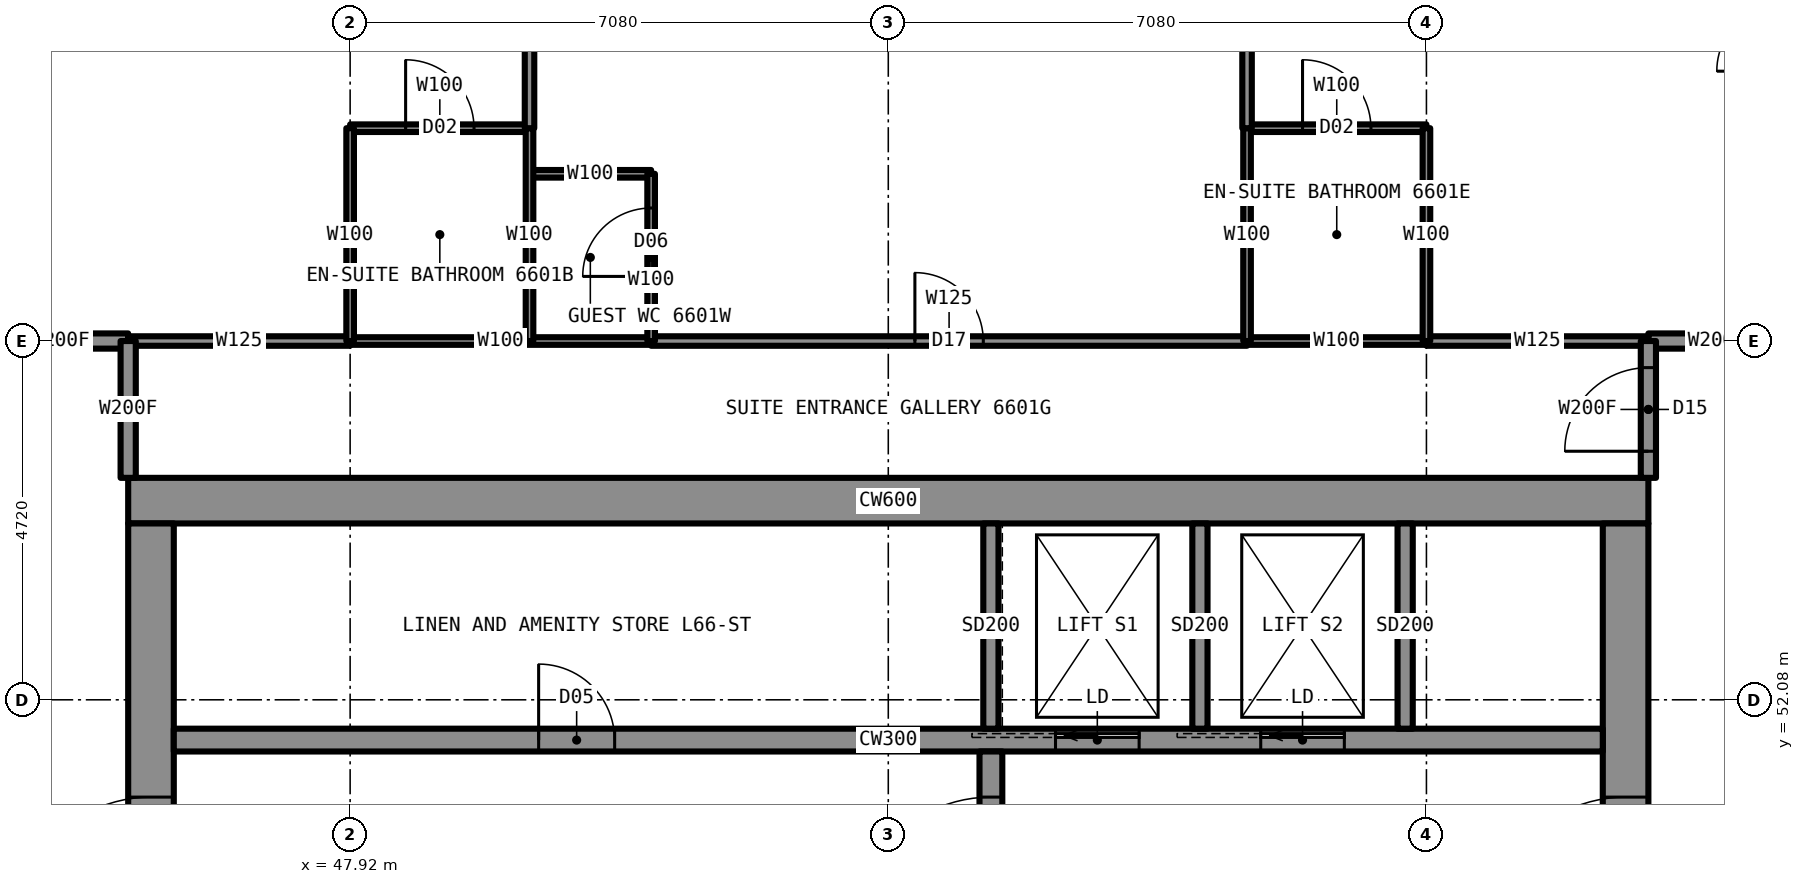
"""IFC4 building model, lengths in metres.
Left out: names, types, materials, properties, quantities, classifications, styles, units other than length and angle.
Written with IfcOpenShell. Run it as: python <this file> out.ifc"""

import sys

from ifc_helpers import new_model, si_unit, direction, frame, frame_2d, origin, place, context, subcontext, project, spatial, rectangle, extrude, element, fill, save


model = new_model("IFC4")
c1 = context("Model", 3, precision=1e-05, world=origin(), true_north=direction((0.0, 1.0)))
c2 = subcontext(c1, "Body", "Model", "MODEL_VIEW")
j1 = project(units=[si_unit("LENGTHUNIT", "METRE"), si_unit("PLANEANGLEUNIT", "RADIAN")], contexts=[c1])
p1 = place(None, origin())
s1 = spatial("IfcSite", under=j1, at=p1, CompositionType="ELEMENT")
p2 = place(p1, origin())
s2 = spatial("IfcBuilding", under=s1, at=p2, CompositionType="ELEMENT")
p3 = place(p2, frame((0.0, 0.0, 237.2)))
s3 = spatial("IfcBuildingStorey", under=s2, at=p3, CompositionType="ELEMENT", Elevation=237.2)
p4 = place(p3, frame((45.0, 54.7, 0.0), z_axis=(0.0, 0.0, 1.0), x_axis=(1.0, 0.0, 0.0)))
e1 = element("IfcWall", 1, at=p4, inside=s3, PredefinedType="SHEAR", context=c2, shape_type="SweptSolid", body=[
    extrude(rectangle(XDim=20.0, YDim=0.6, at=frame_2d((10.0, 0.0))), origin(), (0.0, 0.0, 1.0), 3.5),
])
p5 = place(p3, frame((64.7, 35.6, 0.0), z_axis=(0.0, 0.0, 1.0), x_axis=(0.0, 1.0, 0.0)))
e2 = element("IfcWall", 2, at=p5, inside=s3, PredefinedType="SHEAR", context=c2, shape_type="SweptSolid", body=[
    extrude(rectangle(XDim=18.8, YDim=0.6, at=frame_2d((9.4, 0.0))), origin(), (0.0, 0.0, 1.0), 3.5),
])
p6 = place(p5, frame((13.4, 0.0, 0.0)))
e3 = element("IfcOpeningElement", 3, at=p6, cuts=e2, PredefinedType="OPENING", context=c2, shape_type="SweptSolid", body=[
    extrude(rectangle(XDim=1.8, YDim=2.2, at=frame_2d((0.9, 1.1))), frame((0.0, 0.31, 0.0), z_axis=(0.0, -1.0, 0.0), x_axis=(1.0, 0.0, 0.0)), (0.0, 0.0, 1.0), 0.62),
])
p7 = place(p5, frame((3.6, 0.0, 0.0)))
e4 = element("IfcOpeningElement", 4, at=p7, cuts=e2, PredefinedType="OPENING", context=c2, shape_type="SweptSolid", body=[
    extrude(rectangle(XDim=1.8, YDim=2.2, at=frame_2d((0.9, 1.1))), frame((0.0, 0.31, 0.0), z_axis=(0.0, -1.0, 0.0), x_axis=(1.0, 0.0, 0.0)), (0.0, 0.0, 1.0), 0.62),
])
p8 = place(p3, frame((45.3, 35.6, 0.0), z_axis=(0.0, 0.0, 1.0), x_axis=(0.0, 1.0, 0.0)))
e5 = element("IfcWall", 5, at=p8, inside=s3, PredefinedType="SHEAR", context=c2, shape_type="SweptSolid", body=[
    extrude(rectangle(XDim=18.8, YDim=0.6, at=frame_2d((9.4, 0.0))), origin(), (0.0, 0.0, 1.0), 3.5),
])
p9 = place(p8, frame((13.4, 0.0, 0.0)))
e6 = element("IfcOpeningElement", 6, at=p9, cuts=e5, PredefinedType="OPENING", context=c2, shape_type="SweptSolid", body=[
    extrude(rectangle(XDim=1.8, YDim=2.2, at=frame_2d((0.9, 1.1))), frame((0.0, 0.31, 0.0), z_axis=(0.0, -1.0, 0.0), x_axis=(1.0, 0.0, 0.0)), (0.0, 0.0, 1.0), 0.62),
])
p10 = place(p8, frame((3.6, 0.0, 0.0)))
e7 = element("IfcOpeningElement", 7, at=p10, cuts=e5, PredefinedType="OPENING", context=c2, shape_type="SweptSolid", body=[
    extrude(rectangle(XDim=1.8, YDim=2.2, at=frame_2d((0.9, 1.1))), frame((0.0, 0.31, 0.0), z_axis=(0.0, -1.0, 0.0), x_axis=(1.0, 0.0, 0.0)), (0.0, 0.0, 1.0), 0.62),
])
p11 = place(p8, frame((6.4, 0.0, 0.0)))
e8 = element("IfcOpeningElement", 8, at=p11, cuts=e5, PredefinedType="OPENING", context=c2, shape_type="SweptSolid", body=[
    extrude(rectangle(XDim=1.2, YDim=2.2, at=frame_2d((0.6, 1.1))), frame((0.0, 0.31, 0.0), z_axis=(0.0, -1.0, 0.0), x_axis=(1.0, 0.0, 0.0)), (0.0, 0.0, 1.0), 0.62),
])
p12 = place(p3, frame((45.6, 51.55, 0.0), z_axis=(0.0, 0.0, 1.0), x_axis=(1.0, 0.0, 0.0)))
e9 = element("IfcWall", 9, at=p12, inside=s3, PredefinedType="SHEAR", context=c2, shape_type="SweptSolid", body=[
    extrude(rectangle(XDim=18.8, YDim=0.3, at=frame_2d((9.4, 0.0))), origin(), (0.0, 0.0, 1.0), 3.5),
])
p13 = place(p12, frame((4.8, 0.0, 0.0)))
e10 = element("IfcOpeningElement", 10, at=p13, cuts=e9, PredefinedType="OPENING", context=c2, shape_type="SweptSolid", body=[
    extrude(rectangle(XDim=1.0, YDim=2.1, at=frame_2d((0.5, 1.05))), frame((0.0, 0.16, 0.0), z_axis=(0.0, -1.0, 0.0), x_axis=(1.0, 0.0, 0.0)), (0.0, 0.0, 1.0), 0.32),
])
p14 = place(p12, frame((11.6, 0.0, 0.0)))
e11 = element("IfcOpeningElement", 11, at=p14, cuts=e9, PredefinedType="OPENING", context=c2, shape_type="SweptSolid", body=[
    extrude(rectangle(XDim=1.1, YDim=2.2, at=frame_2d((0.55, 1.1))), frame((0.0, 0.16, 0.0), z_axis=(0.0, -1.0, 0.0), x_axis=(1.0, 0.0, 0.0)), (0.0, 0.0, 1.0), 0.32),
])
p15 = place(p12, frame((14.3, 0.0, 0.0)))
e12 = element("IfcOpeningElement", 12, at=p15, cuts=e9, PredefinedType="OPENING", context=c2, shape_type="SweptSolid", body=[
    extrude(rectangle(XDim=1.1, YDim=2.2, at=frame_2d((0.55, 1.1))), frame((0.0, 0.16, 0.0), z_axis=(0.0, -1.0, 0.0), x_axis=(1.0, 0.0, 0.0)), (0.0, 0.0, 1.0), 0.32),
])
p16 = place(p3, frame((56.35, 41.9, 0.0), z_axis=(0.0, 0.0, 1.0), x_axis=(0.0, 1.0, 0.0)))
e13 = element("IfcWall", 13, at=p16, inside=s3, PredefinedType="SHEAR", context=c2, shape_type="SweptSolid", body=[
    extrude(rectangle(XDim=9.5, YDim=0.3, at=frame_2d((4.75, 0.0))), origin(), (0.0, 0.0, 1.0), 3.5),
])
p17 = place(p16, frame((7.1, 0.0, 0.0)))
e14 = element("IfcOpeningElement", 14, at=p17, cuts=e13, PredefinedType="OPENING", context=c2, shape_type="SweptSolid", body=[
    extrude(rectangle(XDim=1.8, YDim=2.2, at=frame_2d((0.9, 1.1))), frame((0.0, 0.16, 0.0), z_axis=(0.0, -1.0, 0.0), x_axis=(1.0, 0.0, 0.0)), (0.0, 0.0, 1.0), 0.32),
])
p18 = place(p3, frame((47.92, 56.8, 0.0), z_axis=(0.0, 0.0, 1.0), x_axis=(1.0, 0.0, 0.0)))
e15 = element("IfcWall", 15, at=p18, inside=s3, PredefinedType="PARTITIONING", context=c2, shape_type="SweptSolid", body=[
    extrude(rectangle(XDim=3.96, YDim=0.1, at=frame_2d((1.98, 0.0))), origin(), (0.0, 0.0, 1.0), 3.33),
])
p19 = place(p3, frame((59.72, 56.8, 0.0), z_axis=(0.0, 0.0, 1.0), x_axis=(1.0, 0.0, 0.0)))
e16 = element("IfcWall", 16, at=p19, inside=s3, PredefinedType="PARTITIONING", context=c2, shape_type="SweptSolid", body=[
    extrude(rectangle(XDim=2.36, YDim=0.1, at=frame_2d((1.18, 0.0))), origin(), (0.0, 0.0, 1.0), 3.33),
])
p20 = place(p3, frame((43.22, 56.8, 0.0), z_axis=(0.0, 0.0, 1.0), x_axis=(1.0, 0.0, 0.0)))
e17 = element("IfcWall", 17, at=p20, inside=s3, PredefinedType="PARTITIONING", context=c2, shape_type="SweptSolid", body=[
    extrude(rectangle(XDim=1.78, YDim=0.2, at=frame_2d((0.89, 0.0))), origin(), (0.0, 0.0, 1.0), 3.33),
])
p21 = place(p3, frame((65.0, 56.8, 0.0), z_axis=(0.0, 0.0, 1.0), x_axis=(1.0, 0.0, 0.0)))
e18 = element("IfcWall", 18, at=p21, inside=s3, PredefinedType="PARTITIONING", context=c2, shape_type="SweptSolid", body=[
    extrude(rectangle(XDim=1.8, YDim=0.2, at=frame_2d((0.9, 0.0))), origin(), (0.0, 0.0, 1.0), 3.33),
])
p22 = place(p3, frame((45.0, 56.8, 0.0), z_axis=(0.0, 0.0, 1.0), x_axis=(1.0, 0.0, 0.0)))
e19 = element("IfcWall", 19, at=p22, inside=s3, PredefinedType="PARTITIONING", context=c2, shape_type="SweptSolid", body=[
    extrude(rectangle(XDim=2.92, YDim=0.125, at=frame_2d((1.46, 0.0))), origin(), (0.0, 0.0, 1.0), 3.33),
])
p23 = place(p3, frame((51.88, 56.8, 0.0), z_axis=(0.0, 0.0, 1.0), x_axis=(1.0, 0.0, 0.0)))
e20 = element("IfcWall", 20, at=p23, inside=s3, PredefinedType="PARTITIONING", context=c2, shape_type="SweptSolid", body=[
    extrude(rectangle(XDim=7.84, YDim=0.125, at=frame_2d((3.92, 0.0))), origin(), (0.0, 0.0, 1.0), 3.33),
])
p24 = place(p23, frame((3.47, 0.0, 0.0)))
e21 = element("IfcOpeningElement", 21, at=p24, cuts=e20, PredefinedType="OPENING", context=c2, shape_type="SweptSolid", body=[
    extrude(rectangle(XDim=0.9, YDim=2.2, at=frame_2d((0.45, 1.1))), frame((0.0, 0.073, 0.0), z_axis=(0.0, -1.0, 0.0), x_axis=(1.0, 0.0, 0.0)), (0.0, 0.0, 1.0), 0.145),
])
p25 = place(p3, frame((62.08, 56.8, 0.0), z_axis=(0.0, 0.0, 1.0), x_axis=(1.0, 0.0, 0.0)))
e22 = element("IfcWall", 22, at=p25, inside=s3, PredefinedType="PARTITIONING", context=c2, shape_type="SweptSolid", body=[
    extrude(rectangle(XDim=2.92, YDim=0.125, at=frame_2d((1.46, 0.0))), origin(), (0.0, 0.0, 1.0), 3.33),
])
p26 = place(p3, frame((50.28, 59.0, 0.0), z_axis=(0.0, 0.0, 1.0), x_axis=(1.0, 0.0, 0.0)))
e23 = element("IfcWall", 23, at=p26, inside=s3, PredefinedType="PARTITIONING", context=c2, shape_type="SweptSolid", body=[
    extrude(rectangle(XDim=1.6, YDim=0.1, at=frame_2d((0.8, 0.0))), origin(), (0.0, 0.0, 1.0), 3.33),
])
p27 = place(p3, frame((47.92, 59.6, 0.0), z_axis=(0.0, 0.0, 1.0), x_axis=(1.0, 0.0, 0.0)))
e24 = element("IfcWall", 24, at=p27, inside=s3, PredefinedType="PARTITIONING", context=c2, shape_type="SweptSolid", body=[
    extrude(rectangle(XDim=2.36, YDim=0.1, at=frame_2d((1.18, 0.0))), origin(), (0.0, 0.0, 1.0), 3.33),
])
p28 = place(p27, frame((0.73, 0.0, 0.0)))
e25 = element("IfcOpeningElement", 25, at=p28, cuts=e24, PredefinedType="OPENING", context=c2, shape_type="SweptSolid", body=[
    extrude(rectangle(XDim=0.9, YDim=2.1, at=frame_2d((0.45, 1.05))), frame((0.0, 0.06, 0.0), z_axis=(0.0, -1.0, 0.0), x_axis=(1.0, 0.0, 0.0)), (0.0, 0.0, 1.0), 0.12),
])
p29 = place(p3, frame((59.72, 59.6, 0.0), z_axis=(0.0, 0.0, 1.0), x_axis=(1.0, 0.0, 0.0)))
e26 = element("IfcWall", 26, at=p29, inside=s3, PredefinedType="PARTITIONING", context=c2, shape_type="SweptSolid", body=[
    extrude(rectangle(XDim=2.36, YDim=0.1, at=frame_2d((1.18, 0.0))), origin(), (0.0, 0.0, 1.0), 3.33),
])
p30 = place(p29, frame((0.73, 0.0, 0.0)))
e27 = element("IfcOpeningElement", 27, at=p30, cuts=e26, PredefinedType="OPENING", context=c2, shape_type="SweptSolid", body=[
    extrude(rectangle(XDim=0.9, YDim=2.1, at=frame_2d((0.45, 1.05))), frame((0.0, 0.06, 0.0), z_axis=(0.0, -1.0, 0.0), x_axis=(1.0, 0.0, 0.0)), (0.0, 0.0, 1.0), 0.12),
])
p31 = place(p3, frame((45.0, 55.0, 0.0), z_axis=(0.0, 0.0, 1.0), x_axis=(0.0, 1.0, 0.0)))
e28 = element("IfcWall", 28, at=p31, inside=s3, PredefinedType="PARTITIONING", context=c2, shape_type="SweptSolid", body=[
    extrude(rectangle(XDim=1.8, YDim=0.2, at=frame_2d((0.9, 0.0))), origin(), (0.0, 0.0, 1.0), 3.33),
])
p32 = place(p3, frame((51.88, 56.8, 0.0), z_axis=(0.0, 0.0, 1.0), x_axis=(0.0, 1.0, 0.0)))
e29 = element("IfcWall", 29, at=p32, inside=s3, PredefinedType="PARTITIONING", context=c2, shape_type="SweptSolid", body=[
    extrude(rectangle(XDim=2.2, YDim=0.1, at=frame_2d((1.1, 0.0))), origin(), (0.0, 0.0, 1.0), 3.33),
])
p33 = place(p32, frame((0.85, 0.0, 0.0)))
e30 = element("IfcOpeningElement", 30, at=p33, cuts=e29, PredefinedType="OPENING", context=c2, shape_type="SweptSolid", body=[
    extrude(rectangle(XDim=0.9, YDim=2.1, at=frame_2d((0.45, 1.05))), frame((0.0, 0.06, 0.0), z_axis=(0.0, -1.0, 0.0), x_axis=(1.0, 0.0, 0.0)), (0.0, 0.0, 1.0), 0.12),
])
p34 = place(p3, frame((50.28, 56.8, 0.0), z_axis=(0.0, 0.0, 1.0), x_axis=(0.0, 1.0, 0.0)))
e31 = element("IfcWall", 31, at=p34, inside=s3, PredefinedType="PARTITIONING", context=c2, shape_type="SweptSolid", body=[
    extrude(rectangle(XDim=2.8, YDim=0.1, at=frame_2d((1.4, 0.0))), origin(), (0.0, 0.0, 1.0), 3.33),
])
p35 = place(p3, frame((50.28, 59.6, 0.0), z_axis=(0.0, 0.0, 1.0), x_axis=(0.0, 1.0, 0.0)))
e32 = element("IfcWall", 32, at=p35, inside=s3, PredefinedType="PARTITIONING", context=c2, shape_type="SweptSolid", body=[
    extrude(rectangle(XDim=3.1, YDim=0.125, at=frame_2d((1.55, 0.0))), origin(), (0.0, 0.0, 1.0), 3.33),
])
p36 = place(p35, frame((1.25, 0.0, 0.0)))
e33 = element("IfcOpeningElement", 33, at=p36, cuts=e32, PredefinedType="OPENING", context=c2, shape_type="SweptSolid", body=[
    extrude(rectangle(XDim=0.9, YDim=2.2, at=frame_2d((0.45, 1.1))), frame((0.0, 0.073, 0.0), z_axis=(0.0, -1.0, 0.0), x_axis=(1.0, 0.0, 0.0)), (0.0, 0.0, 1.0), 0.145),
])
p37 = place(p3, frame((47.92, 56.8, 0.0), z_axis=(0.0, 0.0, 1.0), x_axis=(0.0, 1.0, 0.0)))
e34 = element("IfcWall", 34, at=p37, inside=s3, PredefinedType="PARTITIONING", context=c2, shape_type="SweptSolid", body=[
    extrude(rectangle(XDim=2.8, YDim=0.1, at=frame_2d((1.4, 0.0))), origin(), (0.0, 0.0, 1.0), 2.573),
])
p38 = place(p3, frame((65.0, 55.0, 0.0), z_axis=(0.0, 0.0, 1.0), x_axis=(0.0, 1.0, 0.0)))
e35 = element("IfcWall", 35, at=p38, inside=s3, PredefinedType="PARTITIONING", context=c2, shape_type="SweptSolid", body=[
    extrude(rectangle(XDim=1.8, YDim=0.2, at=frame_2d((0.9, 0.0))), origin(), (0.0, 0.0, 1.0), 3.33),
])
p39 = place(p38, frame((0.35, 0.0, 0.0)))
e36 = element("IfcOpeningElement", 36, at=p39, cuts=e35, PredefinedType="OPENING", context=c2, shape_type="SweptSolid", body=[
    extrude(rectangle(XDim=1.1, YDim=2.2, at=frame_2d((0.55, 1.1))), frame((0.0, 0.11, 0.0), z_axis=(0.0, -1.0, 0.0), x_axis=(1.0, 0.0, 0.0)), (0.0, 0.0, 1.0), 0.22),
])
p40 = place(p3, frame((59.72, 56.8, 0.0), z_axis=(0.0, 0.0, 1.0), x_axis=(0.0, 1.0, 0.0)))
e37 = element("IfcWall", 37, at=p40, inside=s3, PredefinedType="PARTITIONING", context=c2, shape_type="SweptSolid", body=[
    extrude(rectangle(XDim=2.8, YDim=0.1, at=frame_2d((1.4, 0.0))), origin(), (0.0, 0.0, 1.0), 3.33),
])
p41 = place(p3, frame((59.72, 59.6, 0.0), z_axis=(0.0, 0.0, 1.0), x_axis=(0.0, 1.0, 0.0)))
e38 = element("IfcWall", 38, at=p41, inside=s3, PredefinedType="PARTITIONING", context=c2, shape_type="SweptSolid", body=[
    extrude(rectangle(XDim=3.1, YDim=0.125, at=frame_2d((1.55, 0.0))), origin(), (0.0, 0.0, 1.0), 3.33),
])
p42 = place(p41, frame((1.25, 0.0, 0.0)))
e39 = element("IfcOpeningElement", 39, at=p42, cuts=e38, PredefinedType="OPENING", context=c2, shape_type="SweptSolid", body=[
    extrude(rectangle(XDim=0.9, YDim=2.2, at=frame_2d((0.45, 1.1))), frame((0.0, 0.073, 0.0), z_axis=(0.0, -1.0, 0.0), x_axis=(1.0, 0.0, 0.0)), (0.0, 0.0, 1.0), 0.145),
])
p43 = place(p3, frame((62.08, 56.8, 0.0), z_axis=(0.0, 0.0, 1.0), x_axis=(0.0, 1.0, 0.0)))
e40 = element("IfcWall", 40, at=p43, inside=s3, PredefinedType="PARTITIONING", context=c2, shape_type="SweptSolid", body=[
    extrude(rectangle(XDim=2.8, YDim=0.1, at=frame_2d((1.4, 0.0))), origin(), (0.0, 0.0, 1.0), 2.573),
])
for number, where, z_axis, x_axis in (
    (41, (59.1, 51.7, 0.0), (0.0, 0.0, 1.0), (0.0, 1.0, 0.0)),
    (42, (61.8, 51.7, 0.0), (0.0, 0.0, 1.0), (0.0, 1.0, 0.0)),
    (43, (56.35, 51.7, 0.0), (0.0, 0.0, 1.0), (0.0, 1.0, 0.0)),
):
    element("IfcWall", number, at=place(p3, frame(where, z_axis=z_axis, x_axis=x_axis)), inside=s3, PredefinedType="PARTITIONING", context=c2, shape_type="SweptSolid", body=[
        extrude(rectangle(XDim=2.7, YDim=0.2, at=frame_2d((1.35, 0.0))), origin(), (0.0, 0.0, 1.0), 3.33),
    ])
p44 = place(p24, origin())
e44 = element("IfcDoor", 44, at=p44, inside=s3, OperationType="SINGLE_SWING_LEFT", PredefinedType="DOOR", context=c2, shape_type="SweptSolid", body=[
    extrude(rectangle(XDim=0.9, YDim=2.2, at=frame_2d((0.45, 1.1))), frame((0.0, 0.025, 0.0), z_axis=(0.0, -1.0, 0.0), x_axis=(1.0, 0.0, 0.0)), (0.0, 0.0, 1.0), 0.05),
])
fill(e21, e44)
p45 = place(p28, origin())
e45 = element("IfcDoor", 45, at=p45, inside=s3, OperationType="SINGLE_SWING_RIGHT", PredefinedType="DOOR", context=c2, shape_type="SweptSolid", body=[
    extrude(rectangle(XDim=0.9, YDim=2.1, at=frame_2d((0.45, 1.05))), frame((0.0, 0.025, 0.0), z_axis=(0.0, -1.0, 0.0), x_axis=(1.0, 0.0, 0.0)), (0.0, 0.0, 1.0), 0.05),
])
fill(e25, e45)
p46 = place(p30, origin())
e46 = element("IfcDoor", 46, at=p46, inside=s3, OperationType="SINGLE_SWING_RIGHT", PredefinedType="DOOR", context=c2, shape_type="SweptSolid", body=[
    extrude(rectangle(XDim=0.9, YDim=2.1, at=frame_2d((0.45, 1.05))), frame((0.0, 0.025, 0.0), z_axis=(0.0, -1.0, 0.0), x_axis=(1.0, 0.0, 0.0)), (0.0, 0.0, 1.0), 0.05),
])
fill(e27, e46)
p47 = place(p39, origin())
e47 = element("IfcDoor", 47, at=p47, inside=s3, OperationType="SINGLE_SWING_LEFT", PredefinedType="DOOR", context=c2, shape_type="SweptSolid", body=[
    extrude(rectangle(XDim=1.1, YDim=2.2, at=frame_2d((0.55, 1.1))), frame((0.0, 0.025, 0.0), z_axis=(0.0, -1.0, 0.0), x_axis=(1.0, 0.0, 0.0)), (0.0, 0.0, 1.0), 0.05),
])
fill(e36, e47)
p48 = place(p33, origin())
e48 = element("IfcDoor", 48, at=p48, inside=s3, OperationType="SINGLE_SWING_LEFT", PredefinedType="DOOR", context=c2, shape_type="SweptSolid", body=[
    extrude(rectangle(XDim=0.9, YDim=2.1, at=frame_2d((0.45, 1.05))), frame((0.0, 0.025, 0.0), z_axis=(0.0, -1.0, 0.0), x_axis=(1.0, 0.0, 0.0)), (0.0, 0.0, 1.0), 0.05),
])
fill(e30, e48)
p49 = place(p9, origin())
e49 = element("IfcDoor", 49, at=p49, inside=s3, OperationType="DOUBLE_DOOR_SINGLE_SWING", PredefinedType="DOOR", context=c2, shape_type="SweptSolid", body=[
    extrude(rectangle(XDim=1.8, YDim=2.2, at=frame_2d((0.9, 1.1))), frame((0.0, 0.025, 0.0), z_axis=(0.0, -1.0, 0.0), x_axis=(1.0, 0.0, 0.0)), (0.0, 0.0, 1.0), 0.05),
])
fill(e6, e49)
p50 = place(p6, origin())
e50 = element("IfcDoor", 50, at=p50, inside=s3, OperationType="DOUBLE_DOOR_SINGLE_SWING", PredefinedType="DOOR", context=c2, shape_type="SweptSolid", body=[
    extrude(rectangle(XDim=1.8, YDim=2.2, at=frame_2d((0.9, 1.1))), frame((0.0, 0.025, 0.0), z_axis=(0.0, -1.0, 0.0), x_axis=(1.0, 0.0, 0.0)), (0.0, 0.0, 1.0), 0.05),
])
fill(e3, e50)
p51 = place(p17, origin())
e51 = element("IfcDoor", 51, at=p51, inside=s3, OperationType="DOUBLE_DOOR_SINGLE_SWING", PredefinedType="DOOR", context=c2, shape_type="SweptSolid", body=[
    extrude(rectangle(XDim=1.8, YDim=2.2, at=frame_2d((0.9, 1.1))), frame((0.0, 0.025, 0.0), z_axis=(0.0, -1.0, 0.0), x_axis=(1.0, 0.0, 0.0)), (0.0, 0.0, 1.0), 0.05),
])
fill(e14, e51)
p52 = place(p13, origin())
e52 = element("IfcDoor", 52, at=p52, inside=s3, OperationType="SINGLE_SWING_LEFT", PredefinedType="DOOR", context=c2, shape_type="SweptSolid", body=[
    extrude(rectangle(XDim=1.0, YDim=2.1, at=frame_2d((0.5, 1.05))), frame((0.0, 0.025, 0.0), z_axis=(0.0, -1.0, 0.0), x_axis=(1.0, 0.0, 0.0)), (0.0, 0.0, 1.0), 0.05),
])
fill(e10, e52)
p53 = place(p14, origin())
e53 = element("IfcDoor", 53, at=p53, inside=s3, OperationType="SLIDING_TO_LEFT", PredefinedType="DOOR", context=c2, shape_type="SweptSolid", body=[
    extrude(rectangle(XDim=1.1, YDim=2.2, at=frame_2d((0.55, 1.1))), frame((0.0, 0.025, 0.0), z_axis=(0.0, -1.0, 0.0), x_axis=(1.0, 0.0, 0.0)), (0.0, 0.0, 1.0), 0.05),
])
fill(e11, e53)
p54 = place(p15, origin())
e54 = element("IfcDoor", 54, at=p54, inside=s3, OperationType="SLIDING_TO_LEFT", PredefinedType="DOOR", context=c2, shape_type="SweptSolid", body=[
    extrude(rectangle(XDim=1.1, YDim=2.2, at=frame_2d((0.55, 1.1))), frame((0.0, 0.025, 0.0), z_axis=(0.0, -1.0, 0.0), x_axis=(1.0, 0.0, 0.0)), (0.0, 0.0, 1.0), 0.05),
])
fill(e12, e54)
save(model, sys.argv[1])
